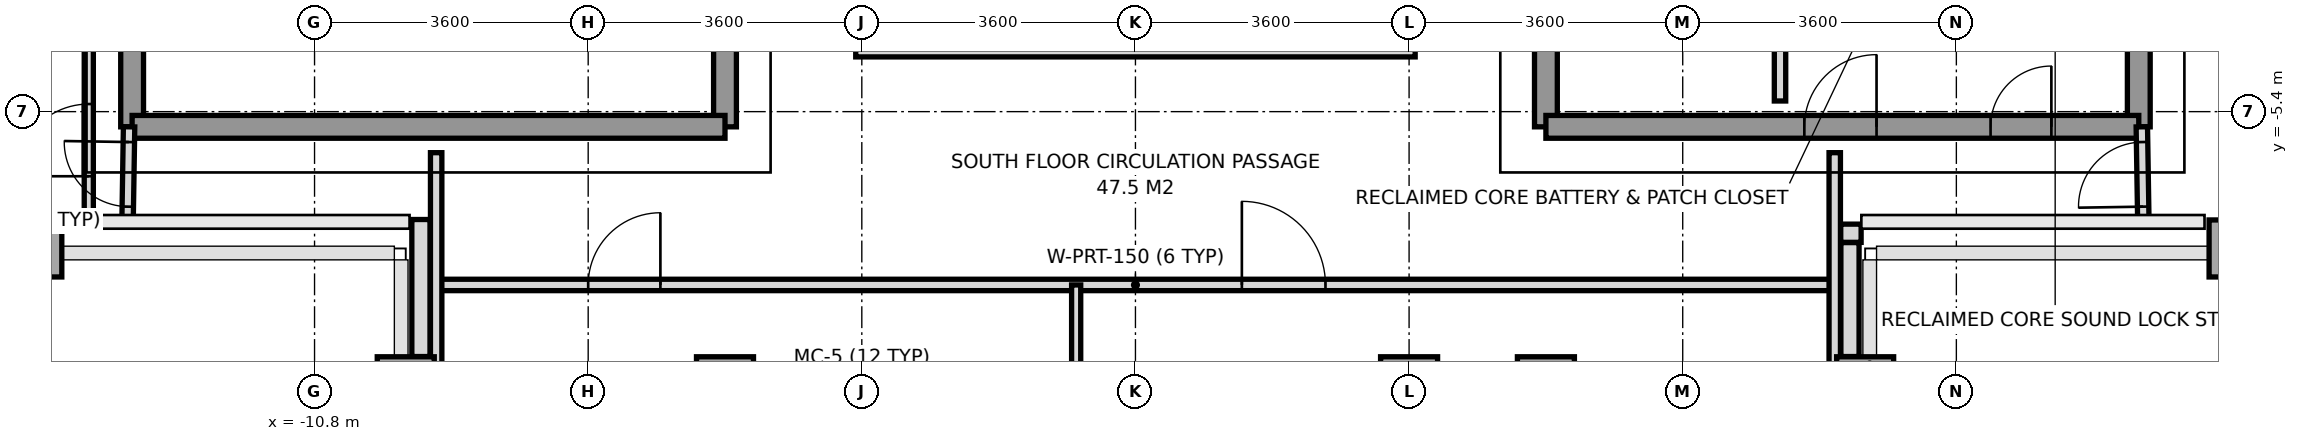
"""IFC4 building model, lengths in metres.
Left out: names, types, materials, properties, quantities, classifications, styles, units other than length and angle.
Written with IfcOpenShell. Run it as: python <this file> out.ifc"""

import sys

from ifc_helpers import new_model, si_unit, direction, frame, frame_2d, origin, origin_2d, place, context, subcontext, project, spatial, rectangle, extrude, source, transform, mapped, element, fill, save


model = new_model("IFC4")
c1 = context("Model", 3, precision=1e-05, world=origin(), true_north=direction((0.0, 1.0)))
c2 = subcontext(c1, "Body", "Model", "MODEL_VIEW")
j1 = project(units=[si_unit("LENGTHUNIT", "METRE"), si_unit("PLANEANGLEUNIT", "RADIAN")], contexts=[c1])
p1 = place(None, origin())
s1 = spatial("IfcSite", under=j1, at=p1, CompositionType="ELEMENT")
p2 = place(p1, origin())
s2 = spatial("IfcBuilding", under=s1, at=p2, CompositionType="ELEMENT")
p3 = place(p2, frame((0.0, 0.0, 236.4)))
s3 = spatial("IfcBuildingStorey", under=s2, at=p3, CompositionType="ELEMENT", Elevation=236.4)
m1 = source(origin(), c2, "Body", "SweptSolid", [
    extrude(rectangle(XDim=0.55, YDim=0.75, at=origin_2d()), origin(), (0.0, 0.0, 1.0), 3.01),
])
p4 = place(p3, frame((-14.4, -7.2, 0.0), z_axis=(0.0, 0.0, 1.0), x_axis=(1.0, 0.0, 0.0)))
e1 = element("IfcColumn", 1, at=p4, inside=s3, PredefinedType="COLUMN", context=c2, shape_type="MappedRepresentation", body=[
    mapped(m1, transform((0.0, 0.0, 0.0), x_axis=(1.0, 0.0, 0.0), y_axis=(0.0, 1.0, 0.0), z_axis=(0.0, 0.0, 1.0), scale=1.0)),
])
m2 = source(origin(), c2, "Body", "SweptSolid", [
    extrude(rectangle(XDim=0.75, YDim=0.75, at=origin_2d()), origin(), (0.0, 0.0, 1.0), 3.01),
])
for number, where, z_axis, x_axis in (
    (2, (-9.6, -9.0, 0.0), (0.0, 0.0, 1.0), (1.0, 0.0, 0.0)),
    (3, (-5.4, -9.0, 0.0), (0.0, 0.0, 1.0), (1.0, 0.0, 0.0)),
    (4, (-3.6, -9.0, 0.0), (0.0, 0.0, 1.0), (1.0, 0.0, 0.0)),
    (5, (3.6, -9.0, 0.0), (0.0, 0.0, 1.0), (1.0, 0.0, 0.0)),
    (6, (5.4, -9.0, 0.0), (0.0, 0.0, 1.0), (1.0, 0.0, 0.0)),
    (7, (9.6, -9.0, 0.0), (0.0, 0.0, 1.0), (1.0, 0.0, 0.0)),
):
    element("IfcColumn", number, at=place(p3, frame(where, z_axis=z_axis, x_axis=x_axis)), inside=s3, PredefinedType="COLUMN", context=c2, shape_type="MappedRepresentation", body=[
        mapped(m2, transform((0.0, 0.0, 0.0), x_axis=(1.0, 0.0, 0.0), y_axis=(0.0, 1.0, 0.0), z_axis=(0.0, 0.0, 1.0), scale=1.0)),
    ])
p5 = place(p3, frame((14.4, -7.2, 0.0), z_axis=(0.0, 0.0, 1.0), x_axis=(1.0, 0.0, 0.0)))
e8 = element("IfcColumn", 8, at=p5, inside=s3, PredefinedType="COLUMN", context=c2, shape_type="MappedRepresentation", body=[
    mapped(m1, transform((0.0, 0.0, 0.0), x_axis=(1.0, 0.0, 0.0), y_axis=(0.0, 1.0, 0.0), z_axis=(0.0, 0.0, 1.0), scale=1.0)),
])
p6 = place(p3, frame((9.547, -7.0, 0.0), z_axis=(0.0, 0.0, 1.0), x_axis=(-1.0, 0.0, 0.0)))
e9 = element("IfcWall", 9, at=p6, inside=s3, PredefinedType="PARAPET", context=c2, shape_type="SweptSolid", body=[
    extrude(rectangle(XDim=0.269, YDim=0.24, at=frame_2d((0.135, 0.0))), origin(), (0.0, 0.0, 1.0), 1.15),
])
p7 = place(p3, frame((9.4, -7.123, 0.0), z_axis=(0.0, 0.0, 1.0), x_axis=(0.0, -1.0, 0.0)))
e10 = element("IfcWall", 10, at=p7, inside=s3, PredefinedType="PARAPET", context=c2, shape_type="SweptSolid", body=[
    extrude(rectangle(XDim=1.499, YDim=0.24, at=frame_2d((0.75, 0.0))), origin(), (0.0, 0.0, 1.0), 1.15),
])
p8 = place(p3, frame((-9.4, -8.622, 0.0), z_axis=(0.0, 0.0, 1.0), x_axis=(0.0, 1.0, 0.0)))
e11 = element("IfcWall", 11, at=p8, inside=s3, PredefinedType="PARAPET", context=c2, shape_type="SweptSolid", body=[
    extrude(rectangle(XDim=1.803, YDim=0.24, at=frame_2d((0.901, 0.0))), origin(), (0.0, 0.0, 1.0), 1.15),
])
p9 = place(p3, frame((-13.2, -5.6, 0.0), z_axis=(0.0, 0.0, 1.0), x_axis=(0.0, 1.0, 0.0)))
e12 = element("IfcWall", 12, at=p9, inside=s3, PredefinedType="SHEAR", context=c2, shape_type="SweptSolid", body=[
    extrude(rectangle(XDim=11.2, YDim=0.3, at=frame_2d((5.6, 0.0))), origin(), (0.0, 0.0, 1.0), 3.01),
])
p10 = place(p3, frame((-5.4, -5.6, 0.0), z_axis=(0.0, 0.0, 1.0), x_axis=(0.0, 1.0, 0.0)))
e13 = element("IfcWall", 13, at=p10, inside=s3, PredefinedType="SHEAR", context=c2, shape_type="SweptSolid", body=[
    extrude(rectangle(XDim=12.5, YDim=0.3, at=frame_2d((6.25, 0.0))), origin(), (0.0, 0.0, 1.0), 3.01),
])
p11 = place(p10, frame((4.55, 0.0, 0.0)))
e14 = element("IfcOpeningElement", 14, at=p11, cuts=e13, PredefinedType="OPENING", context=c2, shape_type="SweptSolid", body=[
    extrude(rectangle(XDim=1.2, YDim=2.2, at=frame_2d((0.6, 1.1))), frame((0.0, 0.16, 0.0), z_axis=(0.0, -1.0, 0.0), x_axis=(1.0, 0.0, 0.0)), (0.0, 0.0, 1.0), 0.32),
])
p12 = place(p10, frame((10.45, 0.0, 0.0)))
e15 = element("IfcOpeningElement", 15, at=p12, cuts=e13, PredefinedType="OPENING", context=c2, shape_type="SweptSolid", body=[
    extrude(rectangle(XDim=1.2, YDim=2.2, at=frame_2d((0.6, 1.1))), frame((0.0, 0.16, 0.0), z_axis=(0.0, -1.0, 0.0), x_axis=(1.0, 0.0, 0.0)), (0.0, 0.0, 1.0), 0.32),
])
p13 = place(p3, frame((-13.2, -5.6, 0.0), z_axis=(0.0, 0.0, 1.0), x_axis=(1.0, 0.0, 0.0)))
e16 = element("IfcWall", 16, at=p13, inside=s3, PredefinedType="SHEAR", context=c2, shape_type="SweptSolid", body=[
    extrude(rectangle(XDim=7.8, YDim=0.3, at=frame_2d((3.9, 0.0))), origin(), (0.0, 0.0, 1.0), 3.01),
])
p14 = place(p3, frame((13.2, -5.6, 0.0), z_axis=(0.0, 0.0, 1.0), x_axis=(0.0, 1.0, 0.0)))
e17 = element("IfcWall", 17, at=p14, inside=s3, PredefinedType="SHEAR", context=c2, shape_type="SweptSolid", body=[
    extrude(rectangle(XDim=11.2, YDim=0.3, at=frame_2d((5.6, 0.0))), origin(), (0.0, 0.0, 1.0), 3.01),
])
p15 = place(p3, frame((5.4, -5.6, 0.0), z_axis=(0.0, 0.0, 1.0), x_axis=(0.0, 1.0, 0.0)))
e18 = element("IfcWall", 18, at=p15, inside=s3, PredefinedType="SHEAR", context=c2, shape_type="SweptSolid", body=[
    extrude(rectangle(XDim=12.5, YDim=0.3, at=frame_2d((6.25, 0.0))), origin(), (0.0, 0.0, 1.0), 3.01),
])
p16 = place(p15, frame((4.55, 0.0, 0.0)))
e19 = element("IfcOpeningElement", 19, at=p16, cuts=e18, PredefinedType="OPENING", context=c2, shape_type="SweptSolid", body=[
    extrude(rectangle(XDim=1.2, YDim=2.2, at=frame_2d((0.6, 1.1))), frame((0.0, 0.16, 0.0), z_axis=(0.0, -1.0, 0.0), x_axis=(1.0, 0.0, 0.0)), (0.0, 0.0, 1.0), 0.32),
])
p17 = place(p15, frame((10.45, 0.0, 0.0)))
e20 = element("IfcOpeningElement", 20, at=p17, cuts=e18, PredefinedType="OPENING", context=c2, shape_type="SweptSolid", body=[
    extrude(rectangle(XDim=1.2, YDim=2.2, at=frame_2d((0.6, 1.1))), frame((0.0, 0.16, 0.0), z_axis=(0.0, -1.0, 0.0), x_axis=(1.0, 0.0, 0.0)), (0.0, 0.0, 1.0), 0.32),
])
p18 = place(p15, frame((7.88, 0.0, 0.0)))
e21 = element("IfcOpeningElement", 21, at=p18, cuts=e18, PredefinedType="OPENING", context=c2, shape_type="SweptSolid", body=[
    extrude(rectangle(XDim=0.8, YDim=2.1, at=frame_2d((0.4, 1.05))), frame((0.0, 0.16, 0.0), z_axis=(0.0, -1.0, 0.0), x_axis=(1.0, 0.0, 0.0)), (0.0, 0.0, 1.0), 0.32),
])
p19 = place(p3, frame((5.4, -5.6, 0.0), z_axis=(0.0, 0.0, 1.0), x_axis=(1.0, 0.0, 0.0)))
e22 = element("IfcWall", 22, at=p19, inside=s3, PredefinedType="SHEAR", context=c2, shape_type="SweptSolid", body=[
    extrude(rectangle(XDim=7.8, YDim=0.3, at=frame_2d((3.9, 0.0))), origin(), (0.0, 0.0, 1.0), 3.01),
])
p20 = place(p19, frame((5.85, 0.0, 0.0)))
e23 = element("IfcOpeningElement", 23, at=p20, cuts=e22, PredefinedType="OPENING", context=c2, shape_type="SweptSolid", body=[
    extrude(rectangle(XDim=0.8, YDim=2.1, at=frame_2d((0.4, 1.05))), frame((0.0, 0.16, 0.0), z_axis=(0.0, -1.0, 0.0), x_axis=(1.0, 0.0, 0.0)), (0.0, 0.0, 1.0), 0.32),
])
p21 = place(p19, frame((3.4, 0.0, 0.0)))
e24 = element("IfcOpeningElement", 24, at=p21, cuts=e22, PredefinedType="OPENING", context=c2, shape_type="SweptSolid", body=[
    extrude(rectangle(XDim=0.95, YDim=2.15, at=frame_2d((0.475, 1.075))), frame((0.0, 0.16, 0.0), z_axis=(0.0, -1.0, 0.0), x_axis=(1.0, 0.0, 0.0)), (0.0, 0.0, 1.0), 0.32),
])
p22 = place(p3, frame((8.48, -5.26, 0.0), z_axis=(0.0, 0.0, 1.0), x_axis=(0.0, 1.0, 0.0)))
e25 = element("IfcWall", 25, at=p22, inside=s3, PredefinedType="PARTITIONING", context=c2, shape_type="SweptSolid", body=[
    extrude(rectangle(XDim=2.94, YDim=0.15, at=frame_2d((1.47, 0.0))), origin(), (0.0, 0.0, 1.0), 3.01),
])
p23 = place(p3, frame((-9.2, -7.68, 0.0), z_axis=(0.0, 0.0, 1.0), x_axis=(1.0, 0.0, 0.0)))
e26 = element("IfcWall", 26, at=p23, inside=s3, PredefinedType="PARTITIONING", context=c2, shape_type="SweptSolid", body=[
    extrude(rectangle(XDim=18.4, YDim=0.15, at=frame_2d((9.2, 0.0))), origin(), (0.0, 0.0, 1.0), 2.57),
])
p24 = place(p23, frame((2.0, 0.0, 0.0)))
e27 = element("IfcOpeningElement", 27, at=p24, cuts=e26, PredefinedType="OPENING", context=c2, shape_type="SweptSolid", body=[
    extrude(rectangle(XDim=0.95, YDim=2.15, at=frame_2d((0.475, 1.075))), frame((0.0, 0.085, 0.0), z_axis=(0.0, -1.0, 0.0), x_axis=(1.0, 0.0, 0.0)), (0.0, 0.0, 1.0), 0.17),
])
p25 = place(p23, frame((10.6, 0.0, 0.0)))
e28 = element("IfcOpeningElement", 28, at=p25, cuts=e26, PredefinedType="OPENING", context=c2, shape_type="SweptSolid", body=[
    extrude(rectangle(XDim=1.1, YDim=2.2, at=frame_2d((0.55, 1.1))), frame((0.0, 0.085, 0.0), z_axis=(0.0, -1.0, 0.0), x_axis=(1.0, 0.0, 0.0)), (0.0, 0.0, 1.0), 0.17),
])
for number, where, z_axis, x_axis in (
    (29, (-9.2, -10.28, 0.0), (0.0, 0.0, 1.0), (0.0, 1.0, 0.0)),
    (30, (9.2, -10.28, 0.0), (0.0, 0.0, 1.0), (0.0, 1.0, 0.0)),
):
    element("IfcWall", number, at=place(p3, frame(where, z_axis=z_axis, x_axis=x_axis)), inside=s3, PredefinedType="PARTITIONING", context=c2, shape_type="SweptSolid", body=[
        extrude(rectangle(XDim=4.34, YDim=0.15, at=frame_2d((2.17, 0.0))), origin(), (0.0, 0.0, 1.0), 2.61),
    ])
p26 = place(p3, frame((-0.78, -19.25, 0.0), z_axis=(0.0, 0.0, 1.0), x_axis=(0.0, 1.0, 0.0)))
e31 = element("IfcWall", 31, at=p26, inside=s3, PredefinedType="PARTITIONING", context=c2, shape_type="SweptSolid", body=[
    extrude(rectangle(XDim=11.57, YDim=0.12, at=frame_2d((5.785, 0.0))), origin(), (0.0, 0.0, 1.0), 2.61),
])
p27 = place(p3, frame((-13.26, -6.85, 0.0), z_axis=(0.0, 0.0, 1.0), x_axis=(0.016013571389, 0.999871774545, 0.0)))
e32 = element("IfcWall", 32, at=p27, inside=s3, PredefinedType="PARTITIONING", context=c2, shape_type="SweptSolid", body=[
    extrude(rectangle(XDim=1.25, YDim=0.15, at=frame_2d((0.625, 0.0))), origin(), (0.0, 0.0, 1.0), 3.01),
])
p28 = place(p27, frame((0.2, 0.0, 0.0)))
e33 = element("IfcOpeningElement", 33, at=p28, cuts=e32, PredefinedType="OPENING", context=c2, shape_type="SweptSolid", body=[
    extrude(rectangle(XDim=0.85, YDim=2.1, at=frame_2d((0.425, 1.05))), frame((0.0, 0.085, 0.0), z_axis=(0.0, -1.0, 0.0), x_axis=(1.0, 0.0, 0.0)), (0.0, 0.0, 1.0), 0.17),
])
p29 = place(p3, frame((-13.77, -6.85, 0.0), z_axis=(0.0, 0.0, 1.0), x_axis=(0.0, 1.0, 0.0)))
e34 = element("IfcWall", 34, at=p29, inside=s3, PredefinedType="PARTITIONING", context=c2, shape_type="SweptSolid", body=[
    extrude(rectangle(XDim=13.7, YDim=0.12, at=frame_2d((6.85, 0.0))), origin(), (0.0, 0.0, 1.0), 2.71),
])
p30 = place(p29, frame((0.6, 0.0, 0.0)))
e35 = element("IfcOpeningElement", 35, at=p30, cuts=e34, PredefinedType="OPENING", context=c2, shape_type="SweptSolid", body=[
    extrude(rectangle(XDim=0.95, YDim=2.15, at=frame_2d((0.475, 1.075))), frame((0.0, 0.07, 0.0), z_axis=(0.0, -1.0, 0.0), x_axis=(1.0, 0.0, 0.0)), (0.0, 0.0, 1.0), 0.14),
])
p31 = place(p3, frame((13.26, -6.85, 0.0), z_axis=(0.0, 0.0, 1.0), x_axis=(-0.016013571389, 0.999871774545, 0.0)))
e36 = element("IfcWall", 36, at=p31, inside=s3, PredefinedType="PARTITIONING", context=c2, shape_type="SweptSolid", body=[
    extrude(rectangle(XDim=1.25, YDim=0.15, at=frame_2d((0.625, 0.0))), origin(), (0.0, 0.0, 1.0), 3.01),
])
p32 = place(p31, frame((0.2, 0.0, 0.0)))
e37 = element("IfcOpeningElement", 37, at=p32, cuts=e36, PredefinedType="OPENING", context=c2, shape_type="SweptSolid", body=[
    extrude(rectangle(XDim=0.85, YDim=2.1, at=frame_2d((0.425, 1.05))), frame((0.0, 0.085, 0.0), z_axis=(0.0, -1.0, 0.0), x_axis=(1.0, 0.0, 0.0)), (0.0, 0.0, 1.0), 0.17),
])
p33 = place(p3, frame((-3.68, -4.56, 0.0), z_axis=(0.0, 0.0, 1.0), x_axis=(1.0, 0.0, 0.0)))
e38 = element("IfcWall", 38, at=p33, inside=s3, PredefinedType="PARAPET", context=c2, shape_type="SweptSolid", body=[
    extrude(rectangle(XDim=7.36, YDim=0.24, at=frame_2d((3.68, 0.0))), origin(), (0.0, 0.0, 1.0), 1.15),
])
m3 = source(origin(), c2, "Body", "SweptSolid", [
    extrude(rectangle(XDim=0.8, YDim=2.1, at=frame_2d((0.4, 1.05))), frame((0.0, 0.025, 0.0), z_axis=(0.0, -1.0, 0.0), x_axis=(1.0, 0.0, 0.0)), (0.0, 0.0, 1.0), 0.05),
])
p34 = place(p20, origin())
e39 = element("IfcDoor", 39, at=p34, inside=s3, OperationType="SINGLE_SWING_RIGHT", PredefinedType="DOOR", context=c2, shape_type="MappedRepresentation", body=[
    mapped(m3, transform((0.0, 0.0, 0.0), x_axis=(1.0, 0.0, 0.0), y_axis=(0.0, 1.0, 0.0), z_axis=(0.0, 0.0, 1.0), scale=1.0)),
])
fill(e23, e39)
m4 = source(origin(), c2, "Body", "SweptSolid", [
    extrude(rectangle(XDim=0.95, YDim=2.15, at=frame_2d((0.475, 1.075))), frame((0.0, 0.025, 0.0), z_axis=(0.0, -1.0, 0.0), x_axis=(1.0, 0.0, 0.0)), (0.0, 0.0, 1.0), 0.05),
])
p35 = place(p21, origin())
e40 = element("IfcDoor", 40, at=p35, inside=s3, OperationType="SINGLE_SWING_RIGHT", PredefinedType="DOOR", context=c2, shape_type="MappedRepresentation", body=[
    mapped(m4, transform((0.0, 0.0, 0.0), x_axis=(1.0, 0.0, 0.0), y_axis=(0.0, 1.0, 0.0), z_axis=(0.0, 0.0, 1.0), scale=1.0)),
])
fill(e24, e40)
p36 = place(p24, origin())
e41 = element("IfcDoor", 41, at=p36, inside=s3, OperationType="SINGLE_SWING_RIGHT", PredefinedType="DOOR", context=c2, shape_type="MappedRepresentation", body=[
    mapped(m4, transform((0.0, 0.0, 0.0), x_axis=(1.0, 0.0, 0.0), y_axis=(0.0, 1.0, 0.0), z_axis=(0.0, 0.0, 1.0), scale=1.0)),
])
fill(e27, e41)
m5 = source(origin(), c2, "Body", "SweptSolid", [
    extrude(rectangle(XDim=1.1, YDim=2.2, at=frame_2d((0.55, 1.1))), frame((0.0, 0.025, 0.0), z_axis=(0.0, -1.0, 0.0), x_axis=(1.0, 0.0, 0.0)), (0.0, 0.0, 1.0), 0.05),
])
p37 = place(p25, origin())
e42 = element("IfcDoor", 42, at=p37, inside=s3, OperationType="SINGLE_SWING_LEFT", PredefinedType="DOOR", context=c2, shape_type="MappedRepresentation", body=[
    mapped(m5, transform((0.0, 0.0, 0.0), x_axis=(1.0, 0.0, 0.0), y_axis=(0.0, 1.0, 0.0), z_axis=(0.0, 0.0, 1.0), scale=1.0)),
])
fill(e28, e42)
p38 = place(p30, origin())
e43 = element("IfcDoor", 43, at=p38, inside=s3, OperationType="SINGLE_SWING_LEFT", PredefinedType="DOOR", context=c2, shape_type="MappedRepresentation", body=[
    mapped(m4, transform((0.0, 0.0, 0.0), x_axis=(1.0, 0.0, 0.0), y_axis=(0.0, 1.0, 0.0), z_axis=(0.0, 0.0, 1.0), scale=1.0)),
])
fill(e35, e43)
m6 = source(origin(), c2, "Body", "SweptSolid", [
    extrude(rectangle(XDim=0.85, YDim=2.1, at=frame_2d((0.425, 1.05))), frame((0.0, 0.025, 0.0), z_axis=(0.0, -1.0, 0.0), x_axis=(1.0, 0.0, 0.0)), (0.0, 0.0, 1.0), 0.05),
])
p39 = place(p28, origin())
e44 = element("IfcDoor", 44, at=p39, inside=s3, OperationType="SINGLE_SWING_RIGHT", PredefinedType="DOOR", context=c2, shape_type="MappedRepresentation", body=[
    mapped(m6, transform((0.0, 0.0, 0.0), x_axis=(1.0, 0.0, 0.0), y_axis=(0.0, 1.0, 0.0), z_axis=(0.0, 0.0, 1.0), scale=1.0)),
])
fill(e33, e44)
p40 = place(p32, origin())
e45 = element("IfcDoor", 45, at=p40, inside=s3, OperationType="SINGLE_SWING_LEFT", PredefinedType="DOOR", context=c2, shape_type="MappedRepresentation", body=[
    mapped(m6, transform((0.0, 0.0, 0.0), x_axis=(1.0, 0.0, 0.0), y_axis=(0.0, 1.0, 0.0), z_axis=(0.0, 0.0, 1.0), scale=1.0)),
])
fill(e37, e45)
save(model, sys.argv[1])
